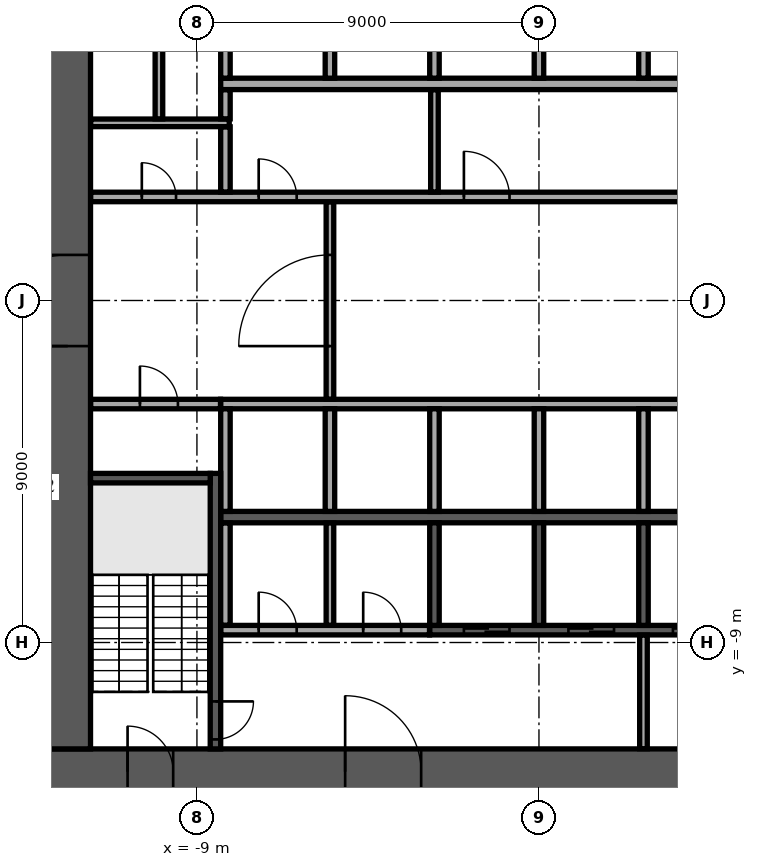
"""IFC4 building model, lengths in metres.
Left out: names, types, materials, properties, quantities, classifications, styles, units other than length and angle.
Written with IfcOpenShell. Run it as: python <this file> out.ifc"""

import sys

from ifc_helpers import new_model, si_unit, direction, frame, frame_2d, origin, place, context, subcontext, project, spatial, rectangle, extrude, element, fill, save


model = new_model("IFC4")
c1 = context("Model", 3, precision=1e-05, world=origin(), true_north=direction((0.0, 1.0)))
c2 = subcontext(c1, "Body", "Model", "MODEL_VIEW")
j1 = project(units=[si_unit("LENGTHUNIT", "METRE"), si_unit("PLANEANGLEUNIT", "RADIAN")], contexts=[c1])
p1 = place(None, origin())
s1 = spatial("IfcSite", under=j1, at=p1, CompositionType="ELEMENT")
p2 = place(p1, origin())
s2 = spatial("IfcBuilding", under=s1, at=p2, CompositionType="ELEMENT")
p3 = place(p2, frame((0.0, 0.0, 51.3)))
s3 = spatial("IfcBuildingStorey", under=s2, at=p3, CompositionType="ELEMENT", Elevation=51.3)
p4 = place(p3, frame((-13.0, -12.4, 0.0), z_axis=(0.0, 0.0, 1.0), x_axis=(1.0, 0.0, 0.0)))
e1 = element("IfcWall", 1, at=p4, inside=s3, PredefinedType="SHEAR", context=c2, shape_type="SweptSolid", body=[
    extrude(rectangle(XDim=26.0, YDim=1.2, at=frame_2d((13.0, 0.0))), origin(), (0.0, 0.0, 1.0), 3.75),
])
p5 = place(p4, frame((7.9, 0.0, 0.0)))
e2 = element("IfcOpeningElement", 2, at=p5, cuts=e1, PredefinedType="OPENING", context=c2, shape_type="SweptSolid", body=[
    extrude(rectangle(XDim=2.0, YDim=2.1, at=frame_2d((1.0, 1.05))), frame((0.0, 0.61, 0.0), z_axis=(0.0, -1.0, 0.0), x_axis=(1.0, 0.0, 0.0)), (0.0, 0.0, 1.0), 1.22),
])
p6 = place(p4, frame((18.025, 0.0, 0.0)))
e3 = element("IfcOpeningElement", 3, at=p6, cuts=e1, PredefinedType="OPENING", context=c2, shape_type="SweptSolid", body=[
    extrude(rectangle(XDim=1.2, YDim=2.1, at=frame_2d((0.6, 1.05))), frame((0.0, 0.61, 0.0), z_axis=(0.0, -1.0, 0.0), x_axis=(1.0, 0.0, 0.0)), (0.0, 0.0, 1.0), 1.22),
])
p7 = place(p4, frame((2.175, 0.0, 0.0)))
e4 = element("IfcOpeningElement", 4, at=p7, cuts=e1, PredefinedType="OPENING", context=c2, shape_type="SweptSolid", body=[
    extrude(rectangle(XDim=1.2, YDim=2.1, at=frame_2d((0.6, 1.05))), frame((0.0, 0.61, 0.0), z_axis=(0.0, -1.0, 0.0), x_axis=(1.0, 0.0, 0.0)), (0.0, 0.0, 1.0), 1.22),
])
p8 = place(p4, frame((22.625, 0.0, 0.0)))
e5 = element("IfcOpeningElement", 5, at=p8, cuts=e1, PredefinedType="OPENING", context=c2, shape_type="SweptSolid", body=[
    extrude(rectangle(XDim=1.2, YDim=2.1, at=frame_2d((0.6, 1.05))), frame((0.0, 0.61, 0.0), z_axis=(0.0, -1.0, 0.0), x_axis=(1.0, 0.0, 0.0)), (0.0, 0.0, 1.0), 1.22),
])
p9 = place(p3, frame((-12.4, -11.8, 0.0), z_axis=(0.0, 0.0, 1.0), x_axis=(0.0, 1.0, 0.0)))
e6 = element("IfcWall", 6, at=p9, inside=s3, PredefinedType="SHEAR", context=c2, shape_type="SweptSolid", body=[
    extrude(rectangle(XDim=23.6, YDim=1.2, at=frame_2d((11.8, 0.0))), origin(), (0.0, 0.0, 1.0), 3.75),
])
p10 = place(p9, frame((10.6, 0.0, 0.0)))
e7 = element("IfcOpeningElement", 7, at=p10, cuts=e6, PredefinedType="OPENING", context=c2, shape_type="SweptSolid", body=[
    extrude(rectangle(XDim=2.4, YDim=2.4, at=frame_2d((1.2, 1.2))), frame((0.0, 0.61, 0.0), z_axis=(0.0, -1.0, 0.0), x_axis=(1.0, 0.0, 0.0)), (0.0, 0.0, 1.0), 1.22),
])
for number, where, z_axis, x_axis in (
    (8, (-8.375, 5.7, 0.0), (0.0, 0.0, 1.0), (1.0, 0.0, 0.0)),
    (9, (-8.375, -5.7, 0.0), (0.0, 0.0, 1.0), (1.0, 0.0, 0.0)),
):
    element("IfcWall", number, at=place(p3, frame(where, z_axis=z_axis, x_axis=x_axis)), inside=s3, PredefinedType="SOLIDWALL", context=c2, shape_type="SweptSolid", body=[
        extrude(rectangle(XDim=16.75, YDim=0.3, at=frame_2d((8.375, 0.0))), origin(), (0.0, 0.0, 1.0), 3.75),
    ])
for number, where, z_axis, x_axis in (
    (10, (-8.25, 5.85, 0.0), (0.0, 0.0, 1.0), (0.0, 1.0, 0.0)),
    (11, (-5.5, 5.85, 0.0), (0.0, 0.0, 1.0), (0.0, 1.0, 0.0)),
    (12, (-2.75, 5.85, 0.0), (0.0, 0.0, 1.0), (0.0, 1.0, 0.0)),
    (13, (0.0, 5.85, 0.0), (0.0, 0.0, 1.0), (0.0, 1.0, 0.0)),
    (14, (2.75, 5.85, 0.0), (0.0, 0.0, 1.0), (0.0, 1.0, 0.0)),
):
    element("IfcWall", number, at=place(p3, frame(where, z_axis=z_axis, x_axis=x_axis)), inside=s3, PredefinedType="SOLIDWALL", context=c2, shape_type="SweptSolid", body=[
        extrude(rectangle(XDim=2.7, YDim=0.25, at=frame_2d((1.35, 0.0))), origin(), (0.0, 0.0, 1.0), 3.75),
    ])
p11 = place(p3, frame((-8.375, -2.725, 0.0), z_axis=(0.0, 0.0, 1.0), x_axis=(1.0, 0.0, 0.0)))
e15 = element("IfcWall", 15, at=p11, inside=s3, PredefinedType="SOLIDWALL", context=c2, shape_type="SweptSolid", body=[
    extrude(rectangle(XDim=14.0, YDim=0.25, at=frame_2d((7.0, 0.0))), origin(), (0.0, 0.0, 1.0), 3.75),
])
for number, where, z_axis, x_axis in (
    (16, (-8.25, -5.55, 0.0), (0.0, 0.0, 1.0), (0.0, 1.0, 0.0)),
    (17, (-5.5, -5.55, 0.0), (0.0, 0.0, 1.0), (0.0, 1.0, 0.0)),
    (18, (-2.75, -5.55, 0.0), (0.0, 0.0, 1.0), (0.0, 1.0, 0.0)),
    (19, (0.0, -5.55, 0.0), (0.0, 0.0, 1.0), (0.0, 1.0, 0.0)),
    (20, (2.75, -5.55, 0.0), (0.0, 0.0, 1.0), (0.0, 1.0, 0.0)),
):
    element("IfcWall", number, at=place(p3, frame(where, z_axis=z_axis, x_axis=x_axis)), inside=s3, PredefinedType="SOLIDWALL", context=c2, shape_type="SweptSolid", body=[
        extrude(rectangle(XDim=2.7, YDim=0.25, at=frame_2d((1.35, 0.0))), origin(), (0.0, 0.0, 1.0), 3.75),
    ])
p12 = place(p3, frame((-2.875, -8.675, 0.0), z_axis=(0.0, 0.0, 1.0), x_axis=(1.0, 0.0, 0.0)))
e21 = element("IfcWall", 21, at=p12, inside=s3, PredefinedType="SOLIDWALL", context=c2, shape_type="SweptSolid", body=[
    extrude(rectangle(XDim=11.25, YDim=0.25, at=frame_2d((5.625, 0.0))), origin(), (0.0, 0.0, 1.0), 3.75),
])
p13 = place(p12, frame((0.9, 0.0, 0.0)))
e22 = element("IfcOpeningElement", 22, at=p13, cuts=e21, PredefinedType="OPENING", context=c2, shape_type="SweptSolid", body=[
    extrude(rectangle(XDim=1.2, YDim=2.1, at=frame_2d((0.6, 1.05))), frame((0.0, 0.135, 0.0), z_axis=(0.0, -1.0, 0.0), x_axis=(1.0, 0.0, 0.0)), (0.0, 0.0, 1.0), 0.27),
])
p14 = place(p12, frame((3.65, 0.0, 0.0)))
e23 = element("IfcOpeningElement", 23, at=p14, cuts=e21, PredefinedType="OPENING", context=c2, shape_type="SweptSolid", body=[
    extrude(rectangle(XDim=1.2, YDim=2.1, at=frame_2d((0.6, 1.05))), frame((0.0, 0.135, 0.0), z_axis=(0.0, -1.0, 0.0), x_axis=(1.0, 0.0, 0.0)), (0.0, 0.0, 1.0), 0.27),
])
p15 = place(p12, frame((6.4, 0.0, 0.0)))
e24 = element("IfcOpeningElement", 24, at=p15, cuts=e21, PredefinedType="OPENING", context=c2, shape_type="SweptSolid", body=[
    extrude(rectangle(XDim=1.2, YDim=2.1, at=frame_2d((0.6, 1.05))), frame((0.0, 0.135, 0.0), z_axis=(0.0, -1.0, 0.0), x_axis=(1.0, 0.0, 0.0)), (0.0, 0.0, 1.0), 0.27),
])
p16 = place(p12, frame((9.15, 0.0, 0.0)))
e25 = element("IfcOpeningElement", 25, at=p16, cuts=e21, PredefinedType="OPENING", context=c2, shape_type="SweptSolid", body=[
    extrude(rectangle(XDim=1.2, YDim=2.1, at=frame_2d((0.6, 1.05))), frame((0.0, 0.135, 0.0), z_axis=(0.0, -1.0, 0.0), x_axis=(1.0, 0.0, 0.0)), (0.0, 0.0, 1.0), 0.27),
])
for number, where, z_axis, x_axis in (
    (26, (-2.75, -8.55, 0.0), (0.0, 0.0, 1.0), (0.0, 1.0, 0.0)),
    (27, (0.0, -8.55, 0.0), (0.0, 0.0, 1.0), (0.0, 1.0, 0.0)),
    (28, (2.75, -8.55, 0.0), (0.0, 0.0, 1.0), (0.0, 1.0, 0.0)),
):
    element("IfcWall", number, at=place(p3, frame(where, z_axis=z_axis, x_axis=x_axis)), inside=s3, PredefinedType="SOLIDWALL", context=c2, shape_type="SweptSolid", body=[
        extrude(rectangle(XDim=2.7, YDim=0.25, at=frame_2d((1.35, 0.0))), origin(), (0.0, 0.0, 1.0), 3.75),
    ])
p17 = place(p3, frame((-8.512, -4.55, 0.0), z_axis=(0.0, 0.0, 1.0), x_axis=(0.0, -1.0, 0.0)))
e29 = element("IfcWall", 29, at=p17, inside=s3, PredefinedType="SOLIDWALL", context=c2, shape_type="SweptSolid", body=[
    extrude(rectangle(XDim=7.25, YDim=0.275, at=frame_2d((3.625, 0.0))), origin(), (0.0, 0.0, 1.0), 3.75),
])
p18 = place(p17, frame((6.0, 0.0, 0.0)))
e30 = element("IfcOpeningElement", 30, at=p18, cuts=e29, PredefinedType="OPENING", context=c2, shape_type="SweptSolid", body=[
    extrude(rectangle(XDim=1.0, YDim=2.1, at=frame_2d((0.5, 1.05))), frame((0.0, 0.147, 0.0), z_axis=(0.0, -1.0, 0.0), x_axis=(1.0, 0.0, 0.0)), (0.0, 0.0, 1.0), 0.295),
])
p19 = place(p3, frame((-8.65, -4.675, 0.0), z_axis=(0.0, 0.0, 1.0), x_axis=(-1.0, 0.0, 0.0)))
e31 = element("IfcWall", 31, at=p19, inside=s3, PredefinedType="SOLIDWALL", context=c2, shape_type="SweptSolid", body=[
    extrude(rectangle(XDim=3.15, YDim=0.25, at=frame_2d((1.575, 0.0))), origin(), (0.0, 0.0, 1.0), 3.75),
])
p20 = place(p3, frame((2.75, -11.795, 0.0), z_axis=(0.0, 0.0, 1.0), x_axis=(0.0, 1.0, 0.0)))
e32 = element("IfcWall", 32, at=p20, inside=s3, PredefinedType="PARTITIONING", context=c2, shape_type="SweptSolid", body=[
    extrude(rectangle(XDim=2.99, YDim=0.2, at=frame_2d((1.495, 0.0))), origin(), (0.0, 0.0, 1.0), 3.75),
])
p21 = place(p3, frame((-8.37, -8.675, 0.0), z_axis=(0.0, 0.0, 1.0), x_axis=(1.0, 0.0, 0.0)))
e33 = element("IfcWall", 33, at=p21, inside=s3, PredefinedType="PARTITIONING", context=c2, shape_type="SweptSolid", body=[
    extrude(rectangle(XDim=5.49, YDim=0.25, at=frame_2d((2.745, 0.0))), origin(), (0.0, 0.0, 1.0), 3.75),
])
p22 = place(p21, frame((0.995, 0.0, 0.0)))
e34 = element("IfcOpeningElement", 34, at=p22, cuts=e33, PredefinedType="OPENING", context=c2, shape_type="SweptSolid", body=[
    extrude(rectangle(XDim=1.0, YDim=2.1, at=frame_2d((0.5, 1.05))), frame((0.0, 0.135, 0.0), z_axis=(0.0, -1.0, 0.0), x_axis=(1.0, 0.0, 0.0)), (0.0, 0.0, 1.0), 0.27),
])
p23 = place(p21, frame((3.745, 0.0, 0.0)))
e35 = element("IfcOpeningElement", 35, at=p23, cuts=e33, PredefinedType="OPENING", context=c2, shape_type="SweptSolid", body=[
    extrude(rectangle(XDim=1.0, YDim=2.1, at=frame_2d((0.5, 1.05))), frame((0.0, 0.135, 0.0), z_axis=(0.0, -1.0, 0.0), x_axis=(1.0, 0.0, 0.0)), (0.0, 0.0, 1.0), 0.27),
])
p24 = place(p3, frame((-8.25, -8.545, 0.0), z_axis=(0.0, 0.0, 1.0), x_axis=(0.0, 1.0, 0.0)))
e36 = element("IfcWall", 36, at=p24, inside=s3, PredefinedType="PARTITIONING", context=c2, shape_type="SweptSolid", body=[
    extrude(rectangle(XDim=2.69, YDim=0.25, at=frame_2d((1.345, 0.0))), origin(), (0.0, 0.0, 1.0), 3.75),
])
p25 = place(p3, frame((-5.5, -8.545, 0.0), z_axis=(0.0, 0.0, 1.0), x_axis=(0.0, 1.0, 0.0)))
e37 = element("IfcWall", 37, at=p25, inside=s3, PredefinedType="PARTITIONING", context=c2, shape_type="SweptSolid", body=[
    extrude(rectangle(XDim=2.69, YDim=0.2, at=frame_2d((1.345, 0.0))), origin(), (0.0, 0.0, 1.0), 3.75),
])
p26 = place(p3, frame((-11.795, -2.725, 0.0), z_axis=(0.0, 0.0, 1.0), x_axis=(1.0, 0.0, 0.0)))
e38 = element("IfcWall", 38, at=p26, inside=s3, PredefinedType="PARTITIONING", context=c2, shape_type="SweptSolid", body=[
    extrude(rectangle(XDim=3.415, YDim=0.25, at=frame_2d((1.708, 0.0))), origin(), (0.0, 0.0, 1.0), 3.75),
])
p27 = place(p26, frame((1.295, 0.0, 0.0)))
e39 = element("IfcOpeningElement", 39, at=p27, cuts=e38, PredefinedType="OPENING", context=c2, shape_type="SweptSolid", body=[
    extrude(rectangle(XDim=1.0, YDim=2.1, at=frame_2d((0.5, 1.05))), frame((0.0, 0.135, 0.0), z_axis=(0.0, -1.0, 0.0), x_axis=(1.0, 0.0, 0.0)), (0.0, 0.0, 1.0), 0.27),
])
p28 = place(p3, frame((-5.5, -2.595, 0.0), z_axis=(0.0, 0.0, 1.0), x_axis=(0.0, 1.0, 0.0)))
e40 = element("IfcWall", 40, at=p28, inside=s3, PredefinedType="PARTITIONING", context=c2, shape_type="SweptSolid", body=[
    extrude(rectangle(XDim=5.19, YDim=0.2, at=frame_2d((2.595, 0.0))), origin(), (0.0, 0.0, 1.0), 3.75),
])
p29 = place(p28, frame((1.395, 0.0, 0.0)))
e41 = element("IfcOpeningElement", 41, at=p29, cuts=e40, PredefinedType="OPENING", context=c2, shape_type="SweptSolid", body=[
    extrude(rectangle(XDim=2.4, YDim=2.4, at=frame_2d((1.2, 1.2))), frame((0.0, 0.11, 0.0), z_axis=(0.0, -1.0, 0.0), x_axis=(1.0, 0.0, 0.0)), (0.0, 0.0, 1.0), 0.22),
])
p30 = place(p3, frame((-11.795, 2.725, 0.0), z_axis=(0.0, 0.0, 1.0), x_axis=(1.0, 0.0, 0.0)))
e42 = element("IfcWall", 42, at=p30, inside=s3, PredefinedType="PARTITIONING", context=c2, shape_type="SweptSolid", body=[
    extrude(rectangle(XDim=23.59, YDim=0.25, at=frame_2d((11.795, 0.0))), origin(), (0.0, 0.0, 1.0), 3.75),
])
p31 = place(p30, frame((21.345, 0.0, 0.0)))
e43 = element("IfcOpeningElement", 43, at=p31, cuts=e42, PredefinedType="OPENING", context=c2, shape_type="SweptSolid", body=[
    extrude(rectangle(XDim=0.9, YDim=2.1, at=frame_2d((0.45, 1.05))), frame((0.0, 0.135, 0.0), z_axis=(0.0, -1.0, 0.0), x_axis=(1.0, 0.0, 0.0)), (0.0, 0.0, 1.0), 0.27),
])
p32 = place(p30, frame((1.345, 0.0, 0.0)))
e44 = element("IfcOpeningElement", 44, at=p32, cuts=e42, PredefinedType="OPENING", context=c2, shape_type="SweptSolid", body=[
    extrude(rectangle(XDim=0.9, YDim=2.1, at=frame_2d((0.45, 1.05))), frame((0.0, 0.135, 0.0), z_axis=(0.0, -1.0, 0.0), x_axis=(1.0, 0.0, 0.0)), (0.0, 0.0, 1.0), 0.27),
])
p33 = place(p30, frame((4.42, 0.0, 0.0)))
e45 = element("IfcOpeningElement", 45, at=p33, cuts=e42, PredefinedType="OPENING", context=c2, shape_type="SweptSolid", body=[
    extrude(rectangle(XDim=1.0, YDim=2.1, at=frame_2d((0.5, 1.05))), frame((0.0, 0.135, 0.0), z_axis=(0.0, -1.0, 0.0), x_axis=(1.0, 0.0, 0.0)), (0.0, 0.0, 1.0), 0.27),
])
p34 = place(p30, frame((9.82, 0.0, 0.0)))
e46 = element("IfcOpeningElement", 46, at=p34, cuts=e42, PredefinedType="OPENING", context=c2, shape_type="SweptSolid", body=[
    extrude(rectangle(XDim=1.2, YDim=2.1, at=frame_2d((0.6, 1.05))), frame((0.0, 0.135, 0.0), z_axis=(0.0, -1.0, 0.0), x_axis=(1.0, 0.0, 0.0)), (0.0, 0.0, 1.0), 0.27),
])
p35 = place(p3, frame((-8.25, 2.855, 0.0), z_axis=(0.0, 0.0, 1.0), x_axis=(0.0, 1.0, 0.0)))
e47 = element("IfcWall", 47, at=p35, inside=s3, PredefinedType="PARTITIONING", context=c2, shape_type="SweptSolid", body=[
    extrude(rectangle(XDim=1.715, YDim=0.25, at=frame_2d((0.857, 0.0))), origin(), (0.0, 0.0, 1.0), 3.75),
])
p36 = place(p3, frame((-2.75, 2.855, 0.0), z_axis=(0.0, 0.0, 1.0), x_axis=(0.0, 1.0, 0.0)))
e48 = element("IfcWall", 48, at=p36, inside=s3, PredefinedType="PARTITIONING", context=c2, shape_type="SweptSolid", body=[
    extrude(rectangle(XDim=2.69, YDim=0.2, at=frame_2d((1.345, 0.0))), origin(), (0.0, 0.0, 1.0), 3.75),
])
p37 = place(p3, frame((-11.795, 4.675, 0.0), z_axis=(0.0, 0.0, 1.0), x_axis=(1.0, 0.0, 0.0)))
e49 = element("IfcWall", 49, at=p37, inside=s3, PredefinedType="PARTITIONING", context=c2, shape_type="SweptSolid", body=[
    extrude(rectangle(XDim=3.645, YDim=0.2, at=frame_2d((1.823, 0.0))), origin(), (0.0, 0.0, 1.0), 3.75),
])
p38 = place(p3, frame((-10.0, 4.78, 0.0), z_axis=(0.0, 0.0, 1.0), x_axis=(0.0, 1.0, 0.0)))
e50 = element("IfcWall", 50, at=p38, inside=s3, PredefinedType="PARTITIONING", context=c2, shape_type="SweptSolid", body=[
    extrude(rectangle(XDim=7.015, YDim=0.2, at=frame_2d((3.507, 0.0))), origin(), (0.0, 0.0, 1.0), 3.75),
])
p39 = place(p38, frame((2.92, 0.0, 0.0)))
e51 = element("IfcOpeningElement", 51, at=p39, cuts=e50, PredefinedType="OPENING", context=c2, shape_type="SweptSolid", body=[
    extrude(rectangle(XDim=1.0, YDim=2.1, at=frame_2d((0.5, 1.05))), frame((0.0, 0.11, 0.0), z_axis=(0.0, -1.0, 0.0), x_axis=(1.0, 0.0, 0.0)), (0.0, 0.0, 1.0), 0.22),
])
p40 = place(p3, frame((-8.25, 4.78, 0.0), z_axis=(0.0, 0.0, 1.0), x_axis=(0.0, 1.0, 0.0)))
e52 = element("IfcWall", 52, at=p40, inside=s3, PredefinedType="PARTITIONING", context=c2, shape_type="SweptSolid", body=[
    extrude(rectangle(XDim=0.765, YDim=0.25, at=frame_2d((0.382, 0.0))), origin(), (0.0, 0.0, 1.0), 3.75),
])
p41 = place(p5, origin())
e53 = element("IfcDoor", 53, at=p41, inside=s3, OperationType="SINGLE_SWING_LEFT", PredefinedType="DOOR", context=c2, shape_type="SweptSolid", body=[
    extrude(rectangle(XDim=2.0, YDim=2.1, at=frame_2d((1.0, 1.05))), frame((0.0, 0.025, 0.0), z_axis=(0.0, -1.0, 0.0), x_axis=(1.0, 0.0, 0.0)), (0.0, 0.0, 1.0), 0.05),
])
fill(e2, e53)
p42 = place(p7, origin())
e54 = element("IfcDoor", 54, at=p42, inside=s3, OperationType="SINGLE_SWING_LEFT", PredefinedType="DOOR", context=c2, shape_type="SweptSolid", body=[
    extrude(rectangle(XDim=1.2, YDim=2.1, at=frame_2d((0.6, 1.05))), frame((0.0, 0.025, 0.0), z_axis=(0.0, -1.0, 0.0), x_axis=(1.0, 0.0, 0.0)), (0.0, 0.0, 1.0), 0.05),
])
fill(e4, e54)
p43 = place(p10, origin())
e55 = element("IfcDoor", 55, at=p43, inside=s3, OperationType="SINGLE_SWING_LEFT", PredefinedType="DOOR", context=c2, shape_type="SweptSolid", body=[
    extrude(rectangle(XDim=2.4, YDim=2.4, at=frame_2d((1.2, 1.2))), frame((0.0, 0.025, 0.0), z_axis=(0.0, -1.0, 0.0), x_axis=(1.0, 0.0, 0.0)), (0.0, 0.0, 1.0), 0.05),
])
fill(e7, e55)
p44 = place(p13, origin())
e56 = element("IfcDoor", 56, at=p44, inside=s3, OperationType="DOUBLE_DOOR_SLIDING", PredefinedType="DOOR", context=c2, shape_type="SweptSolid", body=[
    extrude(rectangle(XDim=1.2, YDim=2.1, at=frame_2d((0.6, 1.05))), frame((0.0, 0.025, 0.0), z_axis=(0.0, -1.0, 0.0), x_axis=(1.0, 0.0, 0.0)), (0.0, 0.0, 1.0), 0.05),
])
fill(e22, e56)
p45 = place(p14, origin())
e57 = element("IfcDoor", 57, at=p45, inside=s3, OperationType="DOUBLE_DOOR_SLIDING", PredefinedType="DOOR", context=c2, shape_type="SweptSolid", body=[
    extrude(rectangle(XDim=1.2, YDim=2.1, at=frame_2d((0.6, 1.05))), frame((0.0, 0.025, 0.0), z_axis=(0.0, -1.0, 0.0), x_axis=(1.0, 0.0, 0.0)), (0.0, 0.0, 1.0), 0.05),
])
fill(e23, e57)
p46 = place(p15, origin())
e58 = element("IfcDoor", 58, at=p46, inside=s3, OperationType="DOUBLE_DOOR_SLIDING", PredefinedType="DOOR", context=c2, shape_type="SweptSolid", body=[
    extrude(rectangle(XDim=1.2, YDim=2.1, at=frame_2d((0.6, 1.05))), frame((0.0, 0.025, 0.0), z_axis=(0.0, -1.0, 0.0), x_axis=(1.0, 0.0, 0.0)), (0.0, 0.0, 1.0), 0.05),
])
fill(e24, e58)
p47 = place(p18, origin())
e59 = element("IfcDoor", 59, at=p47, inside=s3, OperationType="SINGLE_SWING_LEFT", PredefinedType="DOOR", context=c2, shape_type="SweptSolid", body=[
    extrude(rectangle(XDim=1.0, YDim=2.1, at=frame_2d((0.5, 1.05))), frame((0.0, 0.025, 0.0), z_axis=(0.0, -1.0, 0.0), x_axis=(1.0, 0.0, 0.0)), (0.0, 0.0, 1.0), 0.05),
])
fill(e30, e59)
p48 = place(p22, origin())
e60 = element("IfcDoor", 60, at=p48, inside=s3, OperationType="SINGLE_SWING_RIGHT", PredefinedType="DOOR", context=c2, shape_type="SweptSolid", body=[
    extrude(rectangle(XDim=1.0, YDim=2.1, at=frame_2d((0.5, 1.05))), frame((0.0, 0.025, 0.0), z_axis=(0.0, -1.0, 0.0), x_axis=(1.0, 0.0, 0.0)), (0.0, 0.0, 1.0), 0.05),
])
fill(e34, e60)
p49 = place(p23, origin())
e61 = element("IfcDoor", 61, at=p49, inside=s3, OperationType="SINGLE_SWING_RIGHT", PredefinedType="DOOR", context=c2, shape_type="SweptSolid", body=[
    extrude(rectangle(XDim=1.0, YDim=2.1, at=frame_2d((0.5, 1.05))), frame((0.0, 0.025, 0.0), z_axis=(0.0, -1.0, 0.0), x_axis=(1.0, 0.0, 0.0)), (0.0, 0.0, 1.0), 0.05),
])
fill(e35, e61)
p50 = place(p27, origin())
e62 = element("IfcDoor", 62, at=p50, inside=s3, OperationType="SINGLE_SWING_RIGHT", PredefinedType="DOOR", context=c2, shape_type="SweptSolid", body=[
    extrude(rectangle(XDim=1.0, YDim=2.1, at=frame_2d((0.5, 1.05))), frame((0.0, 0.025, 0.0), z_axis=(0.0, -1.0, 0.0), x_axis=(1.0, 0.0, 0.0)), (0.0, 0.0, 1.0), 0.05),
])
fill(e39, e62)
p51 = place(p32, origin())
e63 = element("IfcDoor", 63, at=p51, inside=s3, OperationType="SINGLE_SWING_RIGHT", PredefinedType="DOOR", context=c2, shape_type="SweptSolid", body=[
    extrude(rectangle(XDim=0.9, YDim=2.1, at=frame_2d((0.45, 1.05))), frame((0.0, 0.025, 0.0), z_axis=(0.0, -1.0, 0.0), x_axis=(1.0, 0.0, 0.0)), (0.0, 0.0, 1.0), 0.05),
])
fill(e44, e63)
p52 = place(p33, origin())
e64 = element("IfcDoor", 64, at=p52, inside=s3, OperationType="SINGLE_SWING_RIGHT", PredefinedType="DOOR", context=c2, shape_type="SweptSolid", body=[
    extrude(rectangle(XDim=1.0, YDim=2.1, at=frame_2d((0.5, 1.05))), frame((0.0, 0.025, 0.0), z_axis=(0.0, -1.0, 0.0), x_axis=(1.0, 0.0, 0.0)), (0.0, 0.0, 1.0), 0.05),
])
fill(e45, e64)
p53 = place(p34, origin())
e65 = element("IfcDoor", 65, at=p53, inside=s3, OperationType="SINGLE_SWING_LEFT", PredefinedType="DOOR", context=c2, shape_type="SweptSolid", body=[
    extrude(rectangle(XDim=1.2, YDim=2.1, at=frame_2d((0.6, 1.05))), frame((0.0, 0.025, 0.0), z_axis=(0.0, -1.0, 0.0), x_axis=(1.0, 0.0, 0.0)), (0.0, 0.0, 1.0), 0.05),
])
fill(e46, e65)
p54 = place(p29, origin())
e66 = element("IfcDoor", 66, at=p54, inside=s3, OperationType="DOUBLE_DOOR_DOUBLE_SWING", PredefinedType="DOOR", context=c2, shape_type="SweptSolid", body=[
    extrude(rectangle(XDim=2.4, YDim=2.4, at=frame_2d((1.2, 1.2))), frame((0.0, 0.025, 0.0), z_axis=(0.0, -1.0, 0.0), x_axis=(1.0, 0.0, 0.0)), (0.0, 0.0, 1.0), 0.05),
])
fill(e41, e66)
save(model, sys.argv[1])
